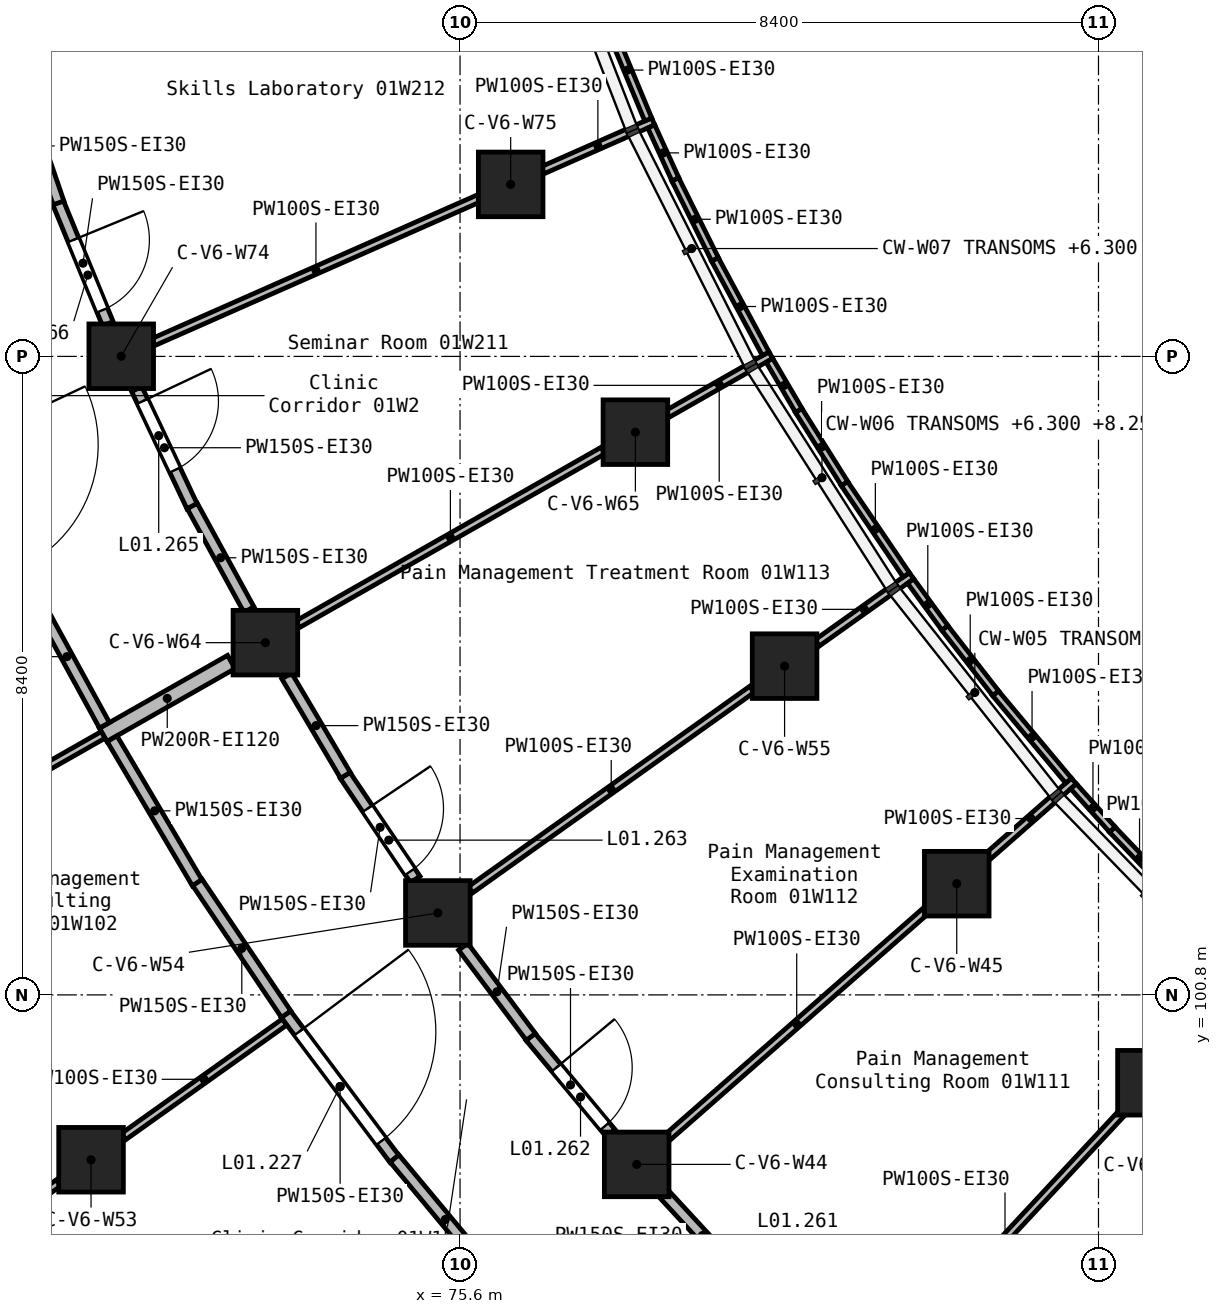
"""IFC4 building model, lengths in metres.
Left out: names, types, materials, properties, quantities, classifications, styles, units other than length and angle.
Written with IfcOpenShell. Run it as: python <this file> out.ifc"""

import sys

from ifc_helpers import new_model, si_unit, direction, frame, frame_2d, origin, origin_2d, place, context, subcontext, project, spatial, rectangle, extrude, element, fill, save


model = new_model("IFC4")
c1 = context("Model", 3, precision=1e-05, world=origin(), true_north=direction((0.0, 1.0)))
c2 = subcontext(c1, "Body", "Model", "MODEL_VIEW")
j1 = project(units=[si_unit("LENGTHUNIT", "METRE"), si_unit("PLANEANGLEUNIT", "RADIAN")], contexts=[c1])
p1 = place(None, origin())
s1 = spatial("IfcSite", under=j1, at=p1, CompositionType="ELEMENT")
p2 = place(p1, origin())
s2 = spatial("IfcBuilding", under=s1, at=p2, CompositionType="ELEMENT")
p3 = place(p2, frame((0.0, 0.0, 5.4)))
s3 = spatial("IfcBuildingStorey", under=s2, at=p3, CompositionType="ELEMENT", Elevation=5.4)
for number, where, z_axis, x_axis in (
    (1, (70.745, 98.631, 0.0), (0.0, 0.0, 1.0), (1.0, 0.0, 0.0)),
    (2, (71.142, 109.202, 0.0), (0.0, 0.0, 1.0), (1.0, 0.0, 0.0)),
    (3, (73.039, 105.434, 0.0), (0.0, 0.0, 1.0), (1.0, 0.0, 0.0)),
    (4, (75.308, 101.878, 0.0), (0.0, 0.0, 1.0), (1.0, 0.0, 0.0)),
    (5, (76.266, 111.463, 0.0), (0.0, 0.0, 1.0), (1.0, 0.0, 0.0)),
    (6, (77.907, 108.203, 0.0), (0.0, 0.0, 1.0), (1.0, 0.0, 0.0)),
    (7, (77.924, 98.57, 0.0), (0.0, 0.0, 1.0), (1.0, 0.0, 0.0)),
    (8, (79.87, 105.125, 0.0), (0.0, 0.0, 1.0), (1.0, 0.0, 0.0)),
    (9, (82.135, 102.263, 0.0), (0.0, 0.0, 1.0), (1.0, 0.0, 0.0)),
    (10, (84.677, 99.644, 0.0), (0.0, 0.0, 1.0), (1.0, 0.0, 0.0)),
):
    element("IfcColumn", number, at=place(p3, frame(where, z_axis=z_axis, x_axis=x_axis)), inside=s3, PredefinedType="COLUMN", context=c2, shape_type="SweptSolid", body=[
        extrude(rectangle(XDim=0.85, YDim=0.85, at=origin_2d()), origin(), (0.0, 0.0, 1.0), 4.5),
    ])
p4 = place(p3, frame((70.905, 104.221, 0.0), z_axis=(0.0, 0.0, 1.0), x_axis=(0.869256176146, 0.494361912198, 0.0)))
e11 = element("IfcWall", 11, at=p4, inside=s3, PredefinedType="SOLIDWALL", context=c2, shape_type="SweptSolid", body=[
    extrude(rectangle(XDim=1.939, YDim=0.2, at=frame_2d((0.97, 0.0))), origin(), (0.0, 0.0, 1.0), 4.15),
])
p5 = place(p3, frame((73.307, 100.547, 0.0), z_axis=(0.0, 0.0, 1.0), x_axis=(0.600377090661, -0.799717043091, 0.0)))
e12 = element("IfcWall", 12, at=p5, inside=s3, PredefinedType="PARTITIONING", context=c2, shape_type="SweptSolid", body=[
    extrude(rectangle(XDim=2.382, YDim=0.15, at=frame_2d((1.191, 0.0))), origin(), (0.0, 0.0, 1.0), 4.15),
])
p6 = place(p5, frame((0.291, 0.0, 0.0)))
e13 = element("IfcOpeningElement", 13, at=p6, cuts=e12, PredefinedType="OPENING", context=c2, shape_type="SweptSolid", body=[
    extrude(rectangle(XDim=1.8, YDim=2.1, at=frame_2d((0.9, 1.05))), frame((0.0, 0.085, 0.0), z_axis=(0.0, -1.0, 0.0), x_axis=(1.0, 0.0, 0.0)), (0.0, 0.0, 1.0), 0.17),
])
p7 = place(p3, frame((71.021, 104.171, 0.0), z_axis=(0.0, 0.0, 1.0), x_axis=(0.50873677225, -0.860922119916, 0.0)))
e14 = element("IfcWall", 14, at=p7, inside=s3, PredefinedType="PARTITIONING", context=c2, shape_type="SweptSolid", body=[
    extrude(rectangle(XDim=2.205, YDim=0.15, at=frame_2d((1.103, 0.0))), origin(), (0.0, 0.0, 1.0), 4.15),
])
p8 = place(p3, frame((72.145, 102.278, 0.0), z_axis=(0.0, 0.0, 1.0), x_axis=(0.558900636953, -0.829234633873, 0.0)))
e15 = element("IfcWall", 15, at=p8, inside=s3, PredefinedType="PARTITIONING", context=c2, shape_type="SweptSolid", body=[
    extrude(rectangle(XDim=2.089, YDim=0.15, at=frame_2d((1.044, 0.0))), origin(), (0.0, 0.0, 1.0), 4.15),
])
p9 = place(p3, frame((74.738, 98.647, 0.0), z_axis=(0.0, 0.0, 1.0), x_axis=(0.640000381719, -0.768374590548, 0.0)))
e16 = element("IfcWall", 16, at=p9, inside=s3, PredefinedType="PARTITIONING", context=c2, shape_type="SweptSolid", body=[
    extrude(rectangle(XDim=2.088, YDim=0.15, at=frame_2d((1.044, 0.0))), origin(), (0.0, 0.0, 1.0), 4.15),
])
p10 = place(p3, frame((69.933, 106.153, 0.0), z_axis=(0.0, 0.0, 1.0), x_axis=(0.479964929401, -0.877287676047, 0.0)))
e17 = element("IfcWall", 17, at=p10, inside=s3, PredefinedType="PARTITIONING", context=c2, shape_type="SweptSolid", body=[
    extrude(rectangle(XDim=2.059, YDim=0.15, at=frame_2d((1.03, 0.0))), origin(), (0.0, 0.0, 1.0), 4.15),
])
p11 = place(p3, frame((74.086, 103.69, 0.0), z_axis=(0.0, 0.0, 1.0), x_axis=(0.558985889655, -0.829177167538, 0.0)))
e18 = element("IfcWall", 18, at=p11, inside=s3, PredefinedType="PARTITIONING", context=c2, shape_type="SweptSolid", body=[
    extrude(rectangle(XDim=1.654, YDim=0.15, at=frame_2d((0.827, 0.0))), origin(), (0.0, 0.0, 1.0), 4.15),
])
p12 = place(p11, frame((0.53, 0.0, 0.0)))
e19 = element("IfcOpeningElement", 19, at=p12, cuts=e18, PredefinedType="OPENING", context=c2, shape_type="SweptSolid", body=[
    extrude(rectangle(XDim=1.0, YDim=2.1, at=frame_2d((0.5, 1.05))), frame((0.0, 0.085, 0.0), z_axis=(0.0, -1.0, 0.0), x_axis=(1.0, 0.0, 0.0)), (0.0, 0.0, 1.0), 0.17),
])
p13 = place(p3, frame((71.346, 108.771, 0.0), z_axis=(0.0, 0.0, 1.0), x_axis=(0.42702903496, -0.904237912997, 0.0)))
e20 = element("IfcWall", 20, at=p13, inside=s3, PredefinedType="PARTITIONING", context=c2, shape_type="SweptSolid", body=[
    extrude(rectangle(XDim=1.708, YDim=0.15, at=frame_2d((0.854, 0.0))), origin(), (0.0, 0.0, 1.0), 4.15),
])
p14 = place(p13, frame((0.178, 0.0, 0.0)))
e21 = element("IfcOpeningElement", 21, at=p14, cuts=e20, PredefinedType="OPENING", context=c2, shape_type="SweptSolid", body=[
    extrude(rectangle(XDim=1.0, YDim=2.1, at=frame_2d((0.5, 1.05))), frame((0.0, 0.085, 0.0), z_axis=(0.0, -1.0, 0.0), x_axis=(1.0, 0.0, 0.0)), (0.0, 0.0, 1.0), 0.17),
])
p15 = place(p3, frame((78.27, 98.195, 0.0), z_axis=(0.0, 0.0, 1.0), x_axis=(0.678273469528, -0.73480956753, 0.0)))
e22 = element("IfcWall", 22, at=p15, inside=s3, PredefinedType="PARTITIONING", context=c2, shape_type="SweptSolid", body=[
    extrude(rectangle(XDim=1.529, YDim=0.15, at=frame_2d((0.764, 0.0))), origin(), (0.0, 0.0, 1.0), 4.15),
])
p16 = place(p3, frame((76.526, 100.249, 0.0), z_axis=(0.0, 0.0, 1.0), x_axis=(0.640038659854, -0.768342706019, 0.0)))
e23 = element("IfcWall", 23, at=p16, inside=s3, PredefinedType="PARTITIONING", context=c2, shape_type="SweptSolid", body=[
    extrude(rectangle(XDim=1.648, YDim=0.15, at=frame_2d((0.824, 0.0))), origin(), (0.0, 0.0, 1.0), 4.15),
])
p17 = place(p16, frame((0.53, 0.0, 0.0)))
e24 = element("IfcOpeningElement", 24, at=p17, cuts=e23, PredefinedType="OPENING", context=c2, shape_type="SweptSolid", body=[
    extrude(rectangle(XDim=1.0, YDim=2.1, at=frame_2d((0.5, 1.05))), frame((0.0, 0.085, 0.0), z_axis=(0.0, -1.0, 0.0), x_axis=(1.0, 0.0, 0.0)), (0.0, 0.0, 1.0), 0.17),
])
p18 = place(p3, frame((70.312, 111.222, 0.0), z_axis=(0.0, 0.0, 1.0), x_axis=(0.380150665177, -0.924924576258, 0.0)))
e25 = element("IfcWall", 25, at=p18, inside=s3, PredefinedType="PARTITIONING", context=c2, shape_type="SweptSolid", body=[
    extrude(rectangle(XDim=1.722, YDim=0.15, at=frame_2d((0.861, 0.0))), origin(), (0.0, 0.0, 1.0), 4.15),
])
p19 = place(p18, frame((0.53, 0.0, 0.0)))
e26 = element("IfcOpeningElement", 26, at=p19, cuts=e25, PredefinedType="OPENING", context=c2, shape_type="SweptSolid", body=[
    extrude(rectangle(XDim=1.0, YDim=2.1, at=frame_2d((0.5, 1.05))), frame((0.0, 0.085, 0.0), z_axis=(0.0, -1.0, 0.0), x_axis=(1.0, 0.0, 0.0)), (0.0, 0.0, 1.0), 0.17),
])
p20 = place(p3, frame((73.319, 104.997, 0.0), z_axis=(0.0, 0.0, 1.0), x_axis=(0.508740142918, -0.86092012811, 0.0)))
e27 = element("IfcWall", 27, at=p20, inside=s3, PredefinedType="PARTITIONING", context=c2, shape_type="SweptSolid", body=[
    extrude(rectangle(XDim=1.519, YDim=0.15, at=frame_2d((0.759, 0.0))), origin(), (0.0, 0.0, 1.0), 4.15),
])
p21 = place(p3, frame((75.641, 101.434, 0.0), z_axis=(0.0, 0.0, 1.0), x_axis=(0.60023710435, -0.799822116825, 0.0)))
e28 = element("IfcWall", 28, at=p21, inside=s3, PredefinedType="PARTITIONING", context=c2, shape_type="SweptSolid", body=[
    extrude(rectangle(XDim=1.483, YDim=0.15, at=frame_2d((0.741, 0.0))), origin(), (0.0, 0.0, 1.0), 4.15),
])
p22 = place(p3, frame((72.077, 107.232, 0.0), z_axis=(0.0, 0.0, 1.0), x_axis=(0.480041086357, -0.877246006209, 0.0)))
e29 = element("IfcWall", 29, at=p22, inside=s3, PredefinedType="PARTITIONING", context=c2, shape_type="SweptSolid", body=[
    extrude(rectangle(XDim=1.553, YDim=0.15, at=frame_2d((0.777, 0.0))), origin(), (0.0, 0.0, 1.0), 4.15),
])
p23 = place(p3, frame((69.802, 112.718, 0.0), z_axis=(0.0, 0.0, 1.0), x_axis=(0.32490745983, -0.945745812863, 0.0)))
e30 = element("IfcWall", 30, at=p23, inside=s3, PredefinedType="PARTITIONING", context=c2, shape_type="SweptSolid", body=[
    extrude(rectangle(XDim=1.584, YDim=0.15, at=frame_2d((0.792, 0.0))), origin(), (0.0, 0.0, 1.0), 4.15),
])
p24 = place(p3, frame((71.562, 109.387, 0.0), z_axis=(0.0, 0.0, 1.0), x_axis=(0.914844742968, 0.403805765515, 0.0)))
e31 = element("IfcWall", 31, at=p24, inside=s3, PredefinedType="PARTITIONING", context=c2, shape_type="SweptSolid", body=[
    extrude(rectangle(XDim=4.683, YDim=0.1, at=frame_2d((2.342, 0.0))), origin(), (0.0, 0.0, 1.0), 4.15),
])
p25 = place(p3, frame((76.686, 111.649, 0.0), z_axis=(0.0, 0.0, 1.0), x_axis=(0.914802710669, 0.403900978649, 0.0)))
e32 = element("IfcWall", 32, at=p25, inside=s3, PredefinedType="PARTITIONING", context=c2, shape_type="SweptSolid", body=[
    extrude(rectangle(XDim=1.59, YDim=0.1, at=frame_2d((0.795, 0.0))), origin(), (0.0, 0.0, 1.0), 4.15),
])
p26 = place(p3, frame((78.338, 98.933, 0.0), z_axis=(0.0, 0.0, 1.0), x_axis=(0.751823288541, 0.659364650863, 0.0)))
e33 = element("IfcWall", 33, at=p26, inside=s3, PredefinedType="PARTITIONING", context=c2, shape_type="SweptSolid", body=[
    extrude(rectangle(XDim=4.5, YDim=0.1, at=frame_2d((2.25, 0.0))), origin(), (0.0, 0.0, 1.0), 4.15),
])
p27 = place(p3, frame((82.549, 102.626, 0.0), z_axis=(0.0, 0.0, 1.0), x_axis=(0.751798799024, 0.659392573347, 0.0)))
e34 = element("IfcWall", 34, at=p27, inside=s3, PredefinedType="PARTITIONING", context=c2, shape_type="SweptSolid", body=[
    extrude(rectangle(XDim=1.498, YDim=0.1, at=frame_2d((0.749, 0.0))), origin(), (0.0, 0.0, 1.0), 4.15),
])
p28 = place(p3, frame((75.736, 102.183, 0.0), z_axis=(0.0, 0.0, 1.0), x_axis=(0.8147152487, 0.579861245072, 0.0)))
e35 = element("IfcWall", 35, at=p28, inside=s3, PredefinedType="PARTITIONING", context=c2, shape_type="SweptSolid", body=[
    extrude(rectangle(XDim=4.548, YDim=0.1, at=frame_2d((2.274, 0.0))), origin(), (0.0, 0.0, 1.0), 4.15),
])
p29 = place(p3, frame((80.298, 105.43, 0.0), z_axis=(0.0, 0.0, 1.0), x_axis=(0.814728250396, 0.579842977027, 0.0)))
e36 = element("IfcWall", 36, at=p29, inside=s3, PredefinedType="PARTITIONING", context=c2, shape_type="SweptSolid", body=[
    extrude(rectangle(XDim=1.524, YDim=0.1, at=frame_2d((0.762, 0.0))), origin(), (0.0, 0.0, 1.0), 4.15),
])
p30 = place(p3, frame((81.227, 95.935, 0.0), z_axis=(0.0, 0.0, 1.0), x_axis=(0.681211440492, 0.732086725288, 0.0)))
e37 = element("IfcWall", 37, at=p30, inside=s3, PredefinedType="PARTITIONING", context=c2, shape_type="SweptSolid", body=[
    extrude(rectangle(XDim=4.53, YDim=0.1, at=frame_2d((2.265, 0.0))), origin(), (0.0, 0.0, 1.0), 4.15),
])
p31 = place(p3, frame((73.463, 105.676, 0.0), z_axis=(0.0, 0.0, 1.0), x_axis=(0.8692549769, 0.494364020874, 0.0)))
e38 = element("IfcWall", 38, at=p31, inside=s3, PredefinedType="PARTITIONING", context=c2, shape_type="SweptSolid", body=[
    extrude(rectangle(XDim=4.625, YDim=0.1, at=frame_2d((2.312, 0.0))), origin(), (0.0, 0.0, 1.0), 4.15),
])
p32 = place(p3, frame((78.331, 108.445, 0.0), z_axis=(0.0, 0.0, 1.0), x_axis=(0.869222922884, 0.494420378154, 0.0)))
e39 = element("IfcWall", 39, at=p32, inside=s3, PredefinedType="PARTITIONING", context=c2, shape_type="SweptSolid", body=[
    extrude(rectangle(XDim=1.561, YDim=0.1, at=frame_2d((0.781, 0.0))), origin(), (0.0, 0.0, 1.0), 4.15),
])
p33 = place(p3, frame((68.595, 102.907, 0.0), z_axis=(0.0, 0.0, 1.0), x_axis=(0.869270757215, 0.494336272846, 0.0)))
e40 = element("IfcWall", 40, at=p33, inside=s3, PredefinedType="PARTITIONING", context=c2, shape_type="SweptSolid", body=[
    extrude(rectangle(XDim=2.656, YDim=0.1, at=frame_2d((1.328, 0.0))), origin(), (0.0, 0.0, 1.0), 4.15),
])
p34 = place(p3, frame((68.861, 97.29, 0.0), z_axis=(0.0, 0.0, 1.0), x_axis=(0.814701484378, 0.5798805837, 0.0)))
e41 = element("IfcWall", 41, at=p34, inside=s3, PredefinedType="PARTITIONING", context=c2, shape_type="SweptSolid", body=[
    extrude(rectangle(XDim=1.787, YDim=0.1, at=frame_2d((0.894, 0.0))), origin(), (0.0, 0.0, 1.0), 4.15),
])
p35 = place(p3, frame((71.173, 98.936, 0.0), z_axis=(0.0, 0.0, 1.0), x_axis=(0.814672160951, 0.579921779355, 0.0)))
e42 = element("IfcWall", 42, at=p35, inside=s3, PredefinedType="PARTITIONING", context=c2, shape_type="SweptSolid", body=[
    extrude(rectangle(XDim=2.598, YDim=0.1, at=frame_2d((1.299, 0.0))), origin(), (0.0, 0.0, 1.0), 4.15),
])
p36 = place(p3, frame((82.645, 104.768, 0.0), z_axis=(0.0, 0.0, 1.0), x_axis=(0.641529064264, -0.767098728785, 0.0)))
e43 = element("IfcWall", 43, at=p36, inside=s3, PredefinedType="PARTITIONING", context=c2, shape_type="SweptSolid", body=[
    extrude(rectangle(XDim=1.499, YDim=0.1, at=frame_2d((0.75, 0.0))), origin(), (0.0, 0.0, 1.0), 4.15),
])
p37 = place(p3, frame((80.657, 107.527, 0.0), z_axis=(0.0, 0.0, 1.0), x_axis=(0.561086061718, -0.827757471332, 0.0)))
e44 = element("IfcWall", 44, at=p37, inside=s3, PredefinedType="PARTITIONING", context=c2, shape_type="SweptSolid", body=[
    extrude(rectangle(XDim=1.452, YDim=0.1, at=frame_2d((0.726, 0.0))), origin(), (0.0, 0.0, 1.0), 4.15),
])
p38 = place(p3, frame((78.952, 110.478, 0.0), z_axis=(0.0, 0.0, 1.0), x_axis=(0.474192635092, -0.880421117889, 0.0)))
e45 = element("IfcWall", 45, at=p38, inside=s3, PredefinedType="PARTITIONING", context=c2, shape_type="SweptSolid", body=[
    extrude(rectangle(XDim=1.412, YDim=0.1, at=frame_2d((0.706, 0.0))), origin(), (0.0, 0.0, 1.0), 4.15),
])
p39 = place(p3, frame((77.536, 113.618, 0.0), z_axis=(0.0, 0.0, 1.0), x_axis=(0.383274532271, -0.923634469318, 0.0)))
e46 = element("IfcWall", 46, at=p39, inside=s3, PredefinedType="PARTITIONING", context=c2, shape_type="SweptSolid", body=[
    extrude(rectangle(XDim=1.41, YDim=0.1, at=frame_2d((0.705, 0.0))), origin(), (0.0, 0.0, 1.0), 4.15),
])
p40 = place(p3, frame((78.431, 111.531, 0.0), z_axis=(0.0, 0.0, 1.0), x_axis=(0.445137160255, -0.8954623993, 0.0)))
e47 = element("IfcWall", 47, at=p40, inside=s3, PredefinedType="PARTITIONING", context=c2, shape_type="SweptSolid", body=[
    extrude(rectangle(XDim=1.177, YDim=0.1, at=frame_2d((0.588, 0.0))), origin(), (0.0, 0.0, 1.0), 4.15),
])
p41 = place(p3, frame((80.054, 108.49, 0.0), z_axis=(0.0, 0.0, 1.0), x_axis=(0.531657145883, -0.846959668008, 0.0)))
e48 = element("IfcWall", 48, at=p41, inside=s3, PredefinedType="PARTITIONING", context=c2, shape_type="SweptSolid", body=[
    extrude(rectangle(XDim=1.137, YDim=0.1, at=frame_2d((0.569, 0.0))), origin(), (0.0, 0.0, 1.0), 4.15),
])
p42 = place(p3, frame((81.977, 105.628, 0.0), z_axis=(0.0, 0.0, 1.0), x_axis=(0.61437453726, -0.78901452963, 0.0)))
e49 = element("IfcWall", 49, at=p42, inside=s3, PredefinedType="PARTITIONING", context=c2, shape_type="SweptSolid", body=[
    extrude(rectangle(XDim=1.09, YDim=0.1, at=frame_2d((0.545, 0.0))), origin(), (0.0, 0.0, 1.0), 4.15),
])
p43 = place(p3, frame((84.18, 102.976, 0.0), z_axis=(0.0, 0.0, 1.0), x_axis=(0.691094804644, -0.722764118502, 0.0)))
e50 = element("IfcWall", 50, at=p43, inside=s3, PredefinedType="PARTITIONING", context=c2, shape_type="SweptSolid", body=[
    extrude(rectangle(XDim=1.041, YDim=0.1, at=frame_2d((0.521, 0.0))), origin(), (0.0, 0.0, 1.0), 4.15),
])
p44 = place(p3, frame((78.116, 112.225, 0.0), z_axis=(0.0, 0.0, 1.0), x_axis=(0.414838086324, -0.909895247891, 0.0)))
e51 = element("IfcWall", 51, at=p44, inside=s3, PredefinedType="PARTITIONING", context=c2, shape_type="SweptSolid", body=[
    extrude(rectangle(XDim=0.764, YDim=0.1, at=frame_2d((0.382, 0.0))), origin(), (0.0, 0.0, 1.0), 4.15),
])
p45 = place(p3, frame((83.672, 103.543, 0.0), z_axis=(0.0, 0.0, 1.0), x_axis=(0.66903540409, -0.743230534945, 0.0)))
e52 = element("IfcWall", 52, at=p45, inside=s3, PredefinedType="PARTITIONING", context=c2, shape_type="SweptSolid", body=[
    extrude(rectangle(XDim=0.763, YDim=0.1, at=frame_2d((0.382, 0.0))), origin(), (0.0, 0.0, 1.0), 4.15),
])
p46 = place(p3, frame((79.671, 109.148, 0.0), z_axis=(0.0, 0.0, 1.0), x_axis=(0.505620943658, -0.862755736773, 0.0)))
e53 = element("IfcWall", 53, at=p46, inside=s3, PredefinedType="PARTITIONING", context=c2, shape_type="SweptSolid", body=[
    extrude(rectangle(XDim=0.763, YDim=0.1, at=frame_2d((0.381, 0.0))), origin(), (0.0, 0.0, 1.0), 4.15),
])
p47 = place(p3, frame((81.529, 106.244, 0.0), z_axis=(0.0, 0.0, 1.0), x_axis=(0.590281268128, -0.807197636578, 0.0)))
e54 = element("IfcWall", 54, at=p47, inside=s3, PredefinedType="PARTITIONING", context=c2, shape_type="SweptSolid", body=[
    extrude(rectangle(XDim=0.763, YDim=0.1, at=frame_2d((0.382, 0.0))), origin(), (0.0, 0.0, 1.0), 4.15),
])
p48 = place(p6, origin())
e55 = element("IfcDoor", 55, at=p48, inside=s3, OperationType="DOUBLE_DOOR_SINGLE_SWING", PredefinedType="DOOR", context=c2, shape_type="SweptSolid", body=[
    extrude(rectangle(XDim=1.8, YDim=2.1, at=frame_2d((0.9, 1.05))), frame((0.0, 0.025, 0.0), z_axis=(0.0, -1.0, 0.0), x_axis=(1.0, 0.0, 0.0)), (0.0, 0.0, 1.0), 0.05),
])
fill(e13, e55)
p49 = place(p17, origin())
e56 = element("IfcDoor", 56, at=p49, inside=s3, OperationType="SINGLE_SWING_RIGHT", PredefinedType="DOOR", context=c2, shape_type="SweptSolid", body=[
    extrude(rectangle(XDim=1.0, YDim=2.1, at=frame_2d((0.5, 1.05))), frame((0.0, 0.025, 0.0), z_axis=(0.0, -1.0, 0.0), x_axis=(1.0, 0.0, 0.0)), (0.0, 0.0, 1.0), 0.05),
])
fill(e24, e56)
p50 = place(p12, origin())
e57 = element("IfcDoor", 57, at=p50, inside=s3, OperationType="SINGLE_SWING_RIGHT", PredefinedType="DOOR", context=c2, shape_type="SweptSolid", body=[
    extrude(rectangle(XDim=1.0, YDim=2.1, at=frame_2d((0.5, 1.05))), frame((0.0, 0.025, 0.0), z_axis=(0.0, -1.0, 0.0), x_axis=(1.0, 0.0, 0.0)), (0.0, 0.0, 1.0), 0.05),
])
fill(e19, e57)
p51 = place(p14, origin())
e58 = element("IfcDoor", 58, at=p51, inside=s3, OperationType="SINGLE_SWING_LEFT", PredefinedType="DOOR", context=c2, shape_type="SweptSolid", body=[
    extrude(rectangle(XDim=1.0, YDim=2.1, at=frame_2d((0.5, 1.05))), frame((0.0, 0.025, 0.0), z_axis=(0.0, -1.0, 0.0), x_axis=(1.0, 0.0, 0.0)), (0.0, 0.0, 1.0), 0.05),
])
fill(e21, e58)
p52 = place(p19, origin())
e59 = element("IfcDoor", 59, at=p52, inside=s3, OperationType="SINGLE_SWING_RIGHT", PredefinedType="DOOR", context=c2, shape_type="SweptSolid", body=[
    extrude(rectangle(XDim=1.0, YDim=2.1, at=frame_2d((0.5, 1.05))), frame((0.0, 0.025, 0.0), z_axis=(0.0, -1.0, 0.0), x_axis=(1.0, 0.0, 0.0)), (0.0, 0.0, 1.0), 0.05),
])
fill(e26, e59)
save(model, sys.argv[1])
